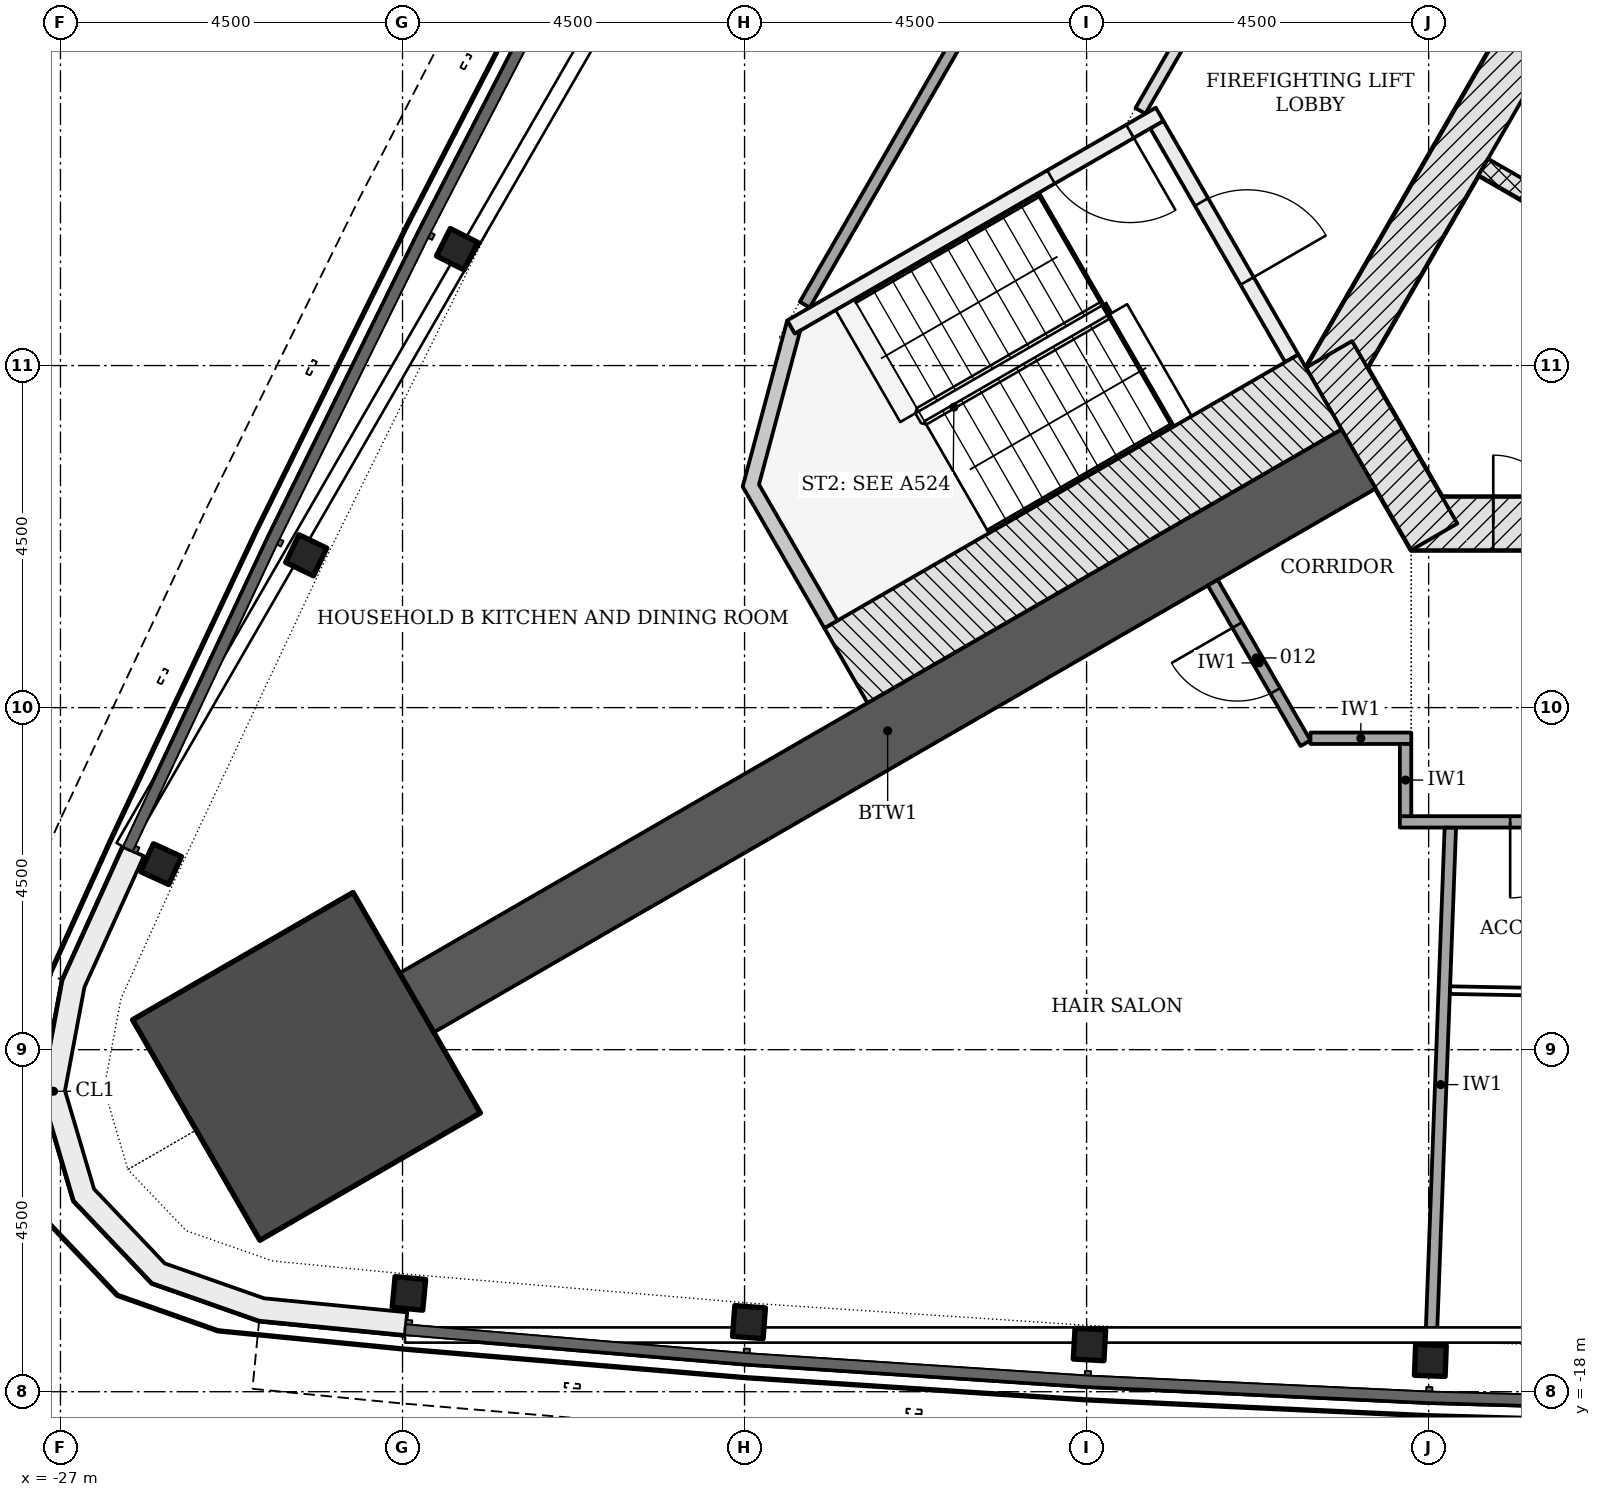
"""IFC4 building model, lengths in metres.
Left out: names, types, materials, properties, quantities, classifications, styles, units other than length and angle.
Written with IfcOpenShell. Run it as: python <this file> out.ifc"""

import sys

from ifc_helpers import new_model, si_unit, direction, frame, frame_2d, origin, origin_2d, place, context, subcontext, project, spatial, polyline, rectangle, i_section, outline, extrude, element, fill, save


model = new_model("IFC4")
c1 = context("Model", 3, precision=1e-05, world=origin(), true_north=direction((0.0, 1.0)))
c2 = subcontext(c1, "Body", "Model", "MODEL_VIEW")
j1 = project(units=[si_unit("LENGTHUNIT", "METRE"), si_unit("PLANEANGLEUNIT", "RADIAN")], contexts=[c1])
p1 = place(None, origin())
s1 = spatial("IfcSite", under=j1, at=p1, CompositionType="ELEMENT")
p2 = place(p1, origin())
s2 = spatial("IfcBuilding", under=s1, at=p2, CompositionType="ELEMENT")
p3 = place(p2, frame((0.0, 0.0, 34.8)))
s3 = spatial("IfcBuildingStorey", under=s2, at=p3, CompositionType="ELEMENT", Elevation=34.8)
p4 = place(p3, frame((-9.229, -6.578, -0.2), z_axis=(0.0, 0.0, 1.0), x_axis=(1.0, 0.0, 0.0)))
e1 = element("IfcWall", 1, at=p4, inside=s3, PredefinedType="SHEAR", context=c2, shape_type="SweptSolid", body=[
    extrude(rectangle(XDim=18.458, YDim=0.7, at=frame_2d((9.229, 0.0))), origin(), (0.0, 0.0, 1.0), 3.6),
])
p5 = place(p4, frame((3.304, 0.0, 0.2)))
e2 = element("IfcOpeningElement", 2, at=p5, cuts=e1, PredefinedType="OPENING", context=c2, shape_type="SweptSolid", body=[
    extrude(rectangle(XDim=1.1, YDim=2.1, at=frame_2d((0.55, 1.05))), frame((0.0, 0.36, 0.0), z_axis=(0.0, -1.0, 0.0), x_axis=(1.0, 0.0, 0.0)), (0.0, 0.0, 1.0), 0.72),
])
p6 = place(p4, frame((5.454, 0.0, 0.2)))
e3 = element("IfcOpeningElement", 3, at=p6, cuts=e1, PredefinedType="OPENING", context=c2, shape_type="SweptSolid", body=[
    extrude(rectangle(XDim=1.1, YDim=2.1, at=frame_2d((0.55, 1.05))), frame((0.0, 0.36, 0.0), z_axis=(0.0, -1.0, 0.0), x_axis=(1.0, 0.0, 0.0)), (0.0, 0.0, 1.0), 0.72),
])
p7 = place(p4, frame((7.604, 0.0, 0.2)))
e4 = element("IfcOpeningElement", 4, at=p7, cuts=e1, PredefinedType="OPENING", context=c2, shape_type="SweptSolid", body=[
    extrude(rectangle(XDim=1.1, YDim=2.1, at=frame_2d((0.55, 1.05))), frame((0.0, 0.36, 0.0), z_axis=(0.0, -1.0, 0.0), x_axis=(1.0, 0.0, 0.0)), (0.0, 0.0, 1.0), 0.72),
])
p8 = place(p4, frame((9.754, 0.0, 0.2)))
e5 = element("IfcOpeningElement", 5, at=p8, cuts=e1, PredefinedType="OPENING", context=c2, shape_type="SweptSolid", body=[
    extrude(rectangle(XDim=1.1, YDim=2.1, at=frame_2d((0.55, 1.05))), frame((0.0, 0.36, 0.0), z_axis=(0.0, -1.0, 0.0), x_axis=(1.0, 0.0, 0.0)), (0.0, 0.0, 1.0), 0.72),
])
p9 = place(p4, frame((11.904, 0.0, 0.2)))
e6 = element("IfcOpeningElement", 6, at=p9, cuts=e1, PredefinedType="OPENING", context=c2, shape_type="SweptSolid", body=[
    extrude(rectangle(XDim=1.1, YDim=2.1, at=frame_2d((0.55, 1.05))), frame((0.0, 0.36, 0.0), z_axis=(0.0, -1.0, 0.0), x_axis=(1.0, 0.0, 0.0)), (0.0, 0.0, 1.0), 0.72),
])
p10 = place(p4, frame((14.054, 0.0, 0.2)))
e7 = element("IfcOpeningElement", 7, at=p10, cuts=e1, PredefinedType="OPENING", context=c2, shape_type="SweptSolid", body=[
    extrude(rectangle(XDim=1.1, YDim=2.1, at=frame_2d((0.55, 1.05))), frame((0.0, 0.36, 0.0), z_axis=(0.0, -1.0, 0.0), x_axis=(1.0, 0.0, 0.0)), (0.0, 0.0, 1.0), 0.72),
])
p11 = place(p4, frame((1.079, 0.0, 0.2)))
e8 = element("IfcOpeningElement", 8, at=p11, cuts=e1, PredefinedType="OPENING", context=c2, shape_type="SweptSolid", body=[
    extrude(rectangle(XDim=0.9, YDim=2.1, at=frame_2d((0.45, 1.05))), frame((0.0, 0.36, 0.0), z_axis=(0.0, -1.0, 0.0), x_axis=(1.0, 0.0, 0.0)), (0.0, 0.0, 1.0), 0.72),
])
p12 = place(p3, frame((-1.083, 11.281, -0.2), z_axis=(0.0, 0.0, 1.0), x_axis=(-0.500001446645, -0.866024568562, 0.0)))
e9 = element("IfcWall", 9, at=p12, inside=s3, PredefinedType="SHEAR", context=c2, shape_type="SweptSolid", body=[
    extrude(rectangle(XDim=18.458, YDim=0.7, at=frame_2d((9.229, 0.0))), origin(), (0.0, 0.0, 1.0), 3.6),
])
p13 = place(p12, frame((8.979, 0.0, 0.2)))
e10 = element("IfcOpeningElement", 10, at=p13, cuts=e9, PredefinedType="OPENING", context=c2, shape_type="SweptSolid", body=[
    extrude(rectangle(XDim=1.2, YDim=2.1, at=frame_2d((0.6, 1.05))), frame((0.0, 0.36, 0.0), z_axis=(0.0, -1.0, 0.0), x_axis=(1.0, 0.0, 0.0)), (0.0, 0.0, 1.0), 0.72),
])
p14 = place(p12, frame((11.029, 0.0, 0.2)))
e11 = element("IfcOpeningElement", 11, at=p14, cuts=e9, PredefinedType="OPENING", context=c2, shape_type="SweptSolid", body=[
    extrude(rectangle(XDim=1.2, YDim=2.1, at=frame_2d((0.6, 1.05))), frame((0.0, 0.36, 0.0), z_axis=(0.0, -1.0, 0.0), x_axis=(1.0, 0.0, 0.0)), (0.0, 0.0, 1.0), 0.72),
])
p15 = place(p3, frame((-10.311, -4.353, -0.2), z_axis=(0.0, 0.0, 1.0), x_axis=(0.500042739161, -0.866000726912, 0.0)))
e12 = element("IfcWall", 12, at=p15, inside=s3, PredefinedType="SHEAR", context=c2, shape_type="SweptSolid", body=[
    extrude(rectangle(XDim=2.771, YDim=0.7, at=frame_2d((1.386, 0.0))), origin(), (0.0, 0.0, 1.0), 3.6),
])
p16 = place(p3, frame((-9.922, -5.728, -0.2), z_axis=(0.0, 0.0, 1.0), x_axis=(-0.866025331845, -0.500000124603, 0.0)))
e13 = element("IfcWall", 13, at=p16, inside=s3, PredefinedType="SHEAR", context=c2, shape_type="SweptSolid", body=[
    extrude(rectangle(XDim=14.309, YDim=0.9, at=frame_2d((7.154, 0.0))), origin(), (0.0, 0.0, 1.0), 3.6),
])
p17 = place(p3, frame((-23.764, -13.72, -0.2), z_axis=(0.0, 0.0, 1.0), x_axis=(-0.866025403784, -0.5, 0.0)))
e14 = element("IfcColumn", 14, at=p17, inside=s3, PredefinedType="COLUMN", context=c2, shape_type="SweptSolid", body=[
    extrude(rectangle(XDim=3.35, YDim=3.35, at=origin_2d()), origin(), (0.0, 0.0, 1.0), 3.6),
])
for number, where, z_axis, x_axis in (
    (15, (-21.781, -2.969, -0.2), (0.0, 0.0, 1.0), (-0.451, -0.893, 0.0)),
    (16, (-23.767, -6.996, -0.2), (0.0, 0.0, 1.0), (-0.434, -0.901, 0.0)),
    (17, (-25.676, -11.059, -0.2), (0.0, 0.0, 1.0), (-0.417, -0.909, 0.0)),
    (18, (-22.416, -16.707, -0.2), (0.0, 0.0, 1.0), (0.996, -0.094, 0.0)),
    (19, (-17.942, -17.084, -0.2), (0.0, 0.0, 1.0), (0.997, -0.075, 0.0)),
    (20, (-13.462, -17.379, -0.2), (0.0, 0.0, 1.0), (0.998, -0.056, 0.0)),
    (21, (-8.977, -17.589, -0.2), (0.0, 0.0, 1.0), (0.999, -0.037, 0.0)),
):
    element("IfcColumn", number, at=place(p3, frame(where, z_axis=z_axis, x_axis=x_axis)), inside=s3, PredefinedType="COLUMN", context=c2, shape_type="SweptSolid", body=[
        extrude(i_section(OverallWidth=0.404, OverallDepth=0.406, WebThickness=0.027, FlangeThickness=0.044, FilletRadius=0.015, at=origin_2d()), origin(), (0.0, 0.0, 1.0), 3.6),
    ])
p18 = place(p3, origin())
e22 = element("IfcWall", 22, at=p18, inside=s3, PredefinedType="NOTDEFINED", context=c2, shape_type="SweptSolid", body=[
    extrude(outline(polyline([(-26.176, -10.83), (-26.973, -12.586), (-27.249, -14.055), (-26.825, -15.488), (-25.796, -16.571), (-24.386, -17.066), (-22.467, -17.254), (-22.438, -16.956), (-24.321, -16.771), (-25.628, -16.312), (-26.558, -15.333), (-26.94, -14.039), (-26.685, -12.677), (-25.903, -10.954), (-26.176, -10.83)])), origin(), (0.0, 0.0, 1.0), 3.3),
])
p19 = place(p3, frame((-8.281, -1.887, -0.2), z_axis=(0.0, 0.0, 1.0), x_axis=(0.866032775405, -0.499987231761, 0.0)))
e23 = element("IfcWall", 23, at=p19, inside=s3, PredefinedType="PARTITIONING", context=c2, shape_type="SweptSolid", body=[
    extrude(rectangle(XDim=2.9, YDim=0.25, at=frame_2d((1.45, 0.0))), origin(), (0.0, 0.0, 1.0), 3.6),
])
p20 = place(p3, frame((-12.576, -1.331, -0.2), z_axis=(0.0, 0.0, 1.0), x_axis=(0.499970499736, -0.8660424351, 0.0)))
e24 = element("IfcWall", 24, at=p20, inside=s3, PredefinedType="SHEAR", context=c2, shape_type="SweptSolid", body=[
    extrude(rectangle(XDim=3.55, YDim=0.2, at=frame_2d((1.775, 0.0))), origin(), (0.0, 0.0, 1.0), 3.6),
])
p21 = place(p20, frame((1.175, 0.0, 0.2)))
e25 = element("IfcOpeningElement", 25, at=p21, cuts=e24, PredefinedType="OPENING", context=c2, shape_type="SweptSolid", body=[
    extrude(rectangle(XDim=1.2, YDim=2.1, at=frame_2d((0.6, 1.05))), frame((0.0, 0.11, 0.0), z_axis=(0.0, -1.0, 0.0), x_axis=(1.0, 0.0, 0.0)), (0.0, 0.0, 1.0), 0.22),
])
p22 = place(p3, frame((-12.539, -1.194, -0.2), z_axis=(0.0, 0.0, 1.0), x_axis=(-0.866045472092, -0.499965239061, 0.0)))
e26 = element("IfcWall", 26, at=p22, inside=s3, PredefinedType="SHEAR", context=c2, shape_type="SweptSolid", body=[
    extrude(rectangle(XDim=5.6, YDim=0.2, at=frame_2d((2.8, 0.0))), origin(), (0.0, 0.0, 1.0), 3.6),
])
p23 = place(p22, frame((0.45, 0.0, 0.2)))
e27 = element("IfcOpeningElement", 27, at=p23, cuts=e26, PredefinedType="OPENING", context=c2, shape_type="SweptSolid", body=[
    extrude(rectangle(XDim=1.2, YDim=2.1, at=frame_2d((0.6, 1.05))), frame((0.0, 0.11, 0.0), z_axis=(0.0, -1.0, 0.0), x_axis=(1.0, 0.0, 0.0)), (0.0, 0.0, 1.0), 0.22),
])
p24 = place(p3, frame((-10.43, -4.847, -0.2), z_axis=(0.0, 0.0, 1.0), x_axis=(-0.866018442252, -0.500012057535, 0.0)))
e28 = element("IfcWall", 28, at=p24, inside=s3, PredefinedType="SHEAR", context=c2, shape_type="SweptSolid", body=[
    extrude(rectangle(XDim=7.2, YDim=1.136, at=frame_2d((3.6, 0.0))), origin(), (0.0, 0.0, 1.0), 3.6),
])
p25 = place(p3, frame((0.0, 0.0, -0.2)))
e29 = element("IfcWall", 29, at=p25, inside=s3, PredefinedType="SHEAR", context=c2, shape_type="SweptSolid", body=[
    extrude(outline(polyline([(-17.439, -3.907), (-18.025, -6.093), (-16.95, -7.955), (-16.777, -7.855), (-17.81, -6.065), (-17.267, -4.039), (-17.339, -4.081), (-17.339, -4.081), (-17.339, -4.081), (-17.339, -4.081), (-17.339, -4.081), (-17.339, -4.081), (-17.339, -4.081), (-17.339, -4.081), (-17.339, -4.081), (-17.339, -4.081), (-17.339, -4.081), (-17.339, -4.081), (-17.339, -4.081), (-17.339, -4.081), (-17.339, -4.081), (-17.339, -4.081), (-17.339, -4.081), (-17.439, -3.907)])), origin(), (0.0, 0.0, 1.0), 3.6),
])
p26 = place(p3, frame((-17.208, -3.699, 0.0), z_axis=(0.0, 0.0, 1.0), x_axis=(0.499997567621, 0.866026808115, 0.0)))
e30 = element("IfcWall", 30, at=p26, inside=s3, PredefinedType="PARTITIONING", context=c2, shape_type="SweptSolid", body=[
    extrude(rectangle(XDim=23.736, YDim=0.15, at=frame_2d((11.868, 0.0))), origin(), (0.0, 0.0, 1.0), 2.768),
])
p27 = place(p26, frame((19.07, 0.0, 0.0)))
e31 = element("IfcOpeningElement", 31, at=p27, cuts=e30, PredefinedType="OPENING", context=c2, shape_type="SweptSolid", body=[
    extrude(rectangle(XDim=1.1, YDim=2.1, at=frame_2d((0.55, 1.05))), frame((0.0, 0.085, 0.0), z_axis=(0.0, -1.0, 0.0), x_axis=(1.0, 0.0, 0.0)), (0.0, 0.0, 1.0), 0.17),
])
p28 = place(p26, frame((7.225, 0.0, 0.0)))
e32 = element("IfcOpeningElement", 32, at=p28, cuts=e30, PredefinedType="OPENING", context=c2, shape_type="SweptSolid", body=[
    extrude(rectangle(XDim=1.5, YDim=2.1, at=frame_2d((0.75, 1.05))), frame((0.0, 0.085, 0.0), z_axis=(0.0, -1.0, 0.0), x_axis=(1.0, 0.0, 0.0)), (0.0, 0.0, 1.0), 0.17),
])
p29 = place(p3, frame((-4.407, 13.374, 0.0), z_axis=(0.0, 0.0, 1.0), x_axis=(-0.499997181693, -0.866027030928, 0.0)))
e33 = element("IfcWall", 33, at=p29, inside=s3, PredefinedType="PARTITIONING", context=c2, shape_type="SweptSolid", body=[
    extrude(rectangle(XDim=16.77, YDim=0.15, at=frame_2d((8.385, 0.0))), origin(), (0.0, 0.0, 1.0), 2.768),
])
p30 = place(p29, frame((8.879, 0.0, 0.0)))
e34 = element("IfcOpeningElement", 34, at=p30, cuts=e33, PredefinedType="OPENING", context=c2, shape_type="SweptSolid", body=[
    extrude(rectangle(XDim=1.0, YDim=2.1, at=frame_2d((0.5, 1.05))), frame((0.0, 0.085, 0.0), z_axis=(0.0, -1.0, 0.0), x_axis=(1.0, 0.0, 0.0)), (0.0, 0.0, 1.0), 0.17),
])
p31 = place(p3, frame((3.689, -10.503, 0.0), z_axis=(0.0, 0.0, 1.0), x_axis=(-1.0, 0.0, 0.0)))
e35 = element("IfcWall", 35, at=p31, inside=s3, PredefinedType="PARTITIONING", context=c2, shape_type="SweptSolid", body=[
    extrude(rectangle(XDim=13.068, YDim=0.15, at=frame_2d((6.534, 0.0))), origin(), (0.0, 0.0, 1.0), 2.768),
])
p32 = place(p31, frame((10.617, 0.0, 0.0)))
e36 = element("IfcOpeningElement", 36, at=p32, cuts=e35, PredefinedType="OPENING", context=c2, shape_type="SweptSolid", body=[
    extrude(rectangle(XDim=1.0, YDim=2.1, at=frame_2d((0.5, 1.05))), frame((0.0, 0.085, 0.0), z_axis=(0.0, -1.0, 0.0), x_axis=(1.0, 0.0, 0.0)), (0.0, 0.0, 1.0), 0.17),
])
p33 = place(p31, frame((8.054, 0.0, 0.0)))
e37 = element("IfcOpeningElement", 37, at=p33, cuts=e35, PredefinedType="OPENING", context=c2, shape_type="SweptSolid", body=[
    extrude(rectangle(XDim=1.0, YDim=2.1, at=frame_2d((0.5, 1.05))), frame((0.0, 0.085, 0.0), z_axis=(0.0, -1.0, 0.0), x_axis=(1.0, 0.0, 0.0)), (0.0, 0.0, 1.0), 0.17),
])
p34 = place(p31, frame((4.734, 0.0, 0.0)))
e38 = element("IfcOpeningElement", 38, at=p34, cuts=e35, PredefinedType="OPENING", context=c2, shape_type="SweptSolid", body=[
    extrude(rectangle(XDim=1.5, YDim=2.1, at=frame_2d((0.75, 1.05))), frame((0.0, 0.085, 0.0), z_axis=(0.0, -1.0, 0.0), x_axis=(1.0, 0.0, 0.0)), (0.0, 0.0, 1.0), 0.17),
])
p35 = place(p3, frame((-10.62, -9.468, 0.0), z_axis=(0.0, 0.0, 1.0), x_axis=(-0.500045838785, 0.865998937132, 0.0)))
e39 = element("IfcWall", 39, at=p35, inside=s3, PredefinedType="PARTITIONING", context=c2, shape_type="SweptSolid", body=[
    extrude(rectangle(XDim=2.44, YDim=0.15, at=frame_2d((1.22, 0.0))), origin(), (0.0, 0.0, 1.0), 3.4),
])
p36 = place(p35, frame((0.795, 0.0, 0.0)))
e40 = element("IfcOpeningElement", 40, at=p36, cuts=e39, PredefinedType="OPENING", context=c2, shape_type="SweptSolid", body=[
    extrude(rectangle(XDim=1.0, YDim=2.1, at=frame_2d((0.5, 1.05))), frame((0.0, 0.085, 0.0), z_axis=(0.0, -1.0, 0.0), x_axis=(1.0, 0.0, 0.0)), (0.0, 0.0, 1.0), 0.17),
])
p37 = place(p3, frame((-10.555, -9.403, 0.0), z_axis=(0.0, 0.0, 1.0), x_axis=(1.0, 0.0, 0.0)))
e41 = element("IfcWall", 41, at=p37, inside=s3, PredefinedType="PARTITIONING", context=c2, shape_type="SweptSolid", body=[
    extrude(rectangle(XDim=1.326, YDim=0.15, at=frame_2d((0.663, 0.0))), origin(), (0.0, 0.0, 1.0), 3.4),
])
p38 = place(p3, frame((-9.304, -10.428, 0.0), z_axis=(0.0, 0.0, 1.0), x_axis=(0.0, 1.0, 0.0)))
e42 = element("IfcWall", 42, at=p38, inside=s3, PredefinedType="PARTITIONING", context=c2, shape_type="SweptSolid", body=[
    extrude(rectangle(XDim=0.95, YDim=0.15, at=frame_2d((0.475, 0.0))), origin(), (0.0, 0.0, 1.0), 3.4),
])
p39 = place(p3, frame((-8.968, -17.339, 0.0), z_axis=(0.0, 0.0, 1.0), x_axis=(0.037473660589, 0.999297615709, 0.0)))
e43 = element("IfcWall", 43, at=p39, inside=s3, PredefinedType="PARTITIONING", context=c2, shape_type="SweptSolid", body=[
    extrude(rectangle(XDim=6.762, YDim=0.15, at=frame_2d((3.381, 0.0))), origin(), (0.0, 0.0, 1.0), 2.778),
])
p40 = place(p3, frame((-8.719, -12.717, 0.0), z_axis=(0.0, 0.0, 1.0), x_axis=(0.999824773789, -0.018719554441, 0.0)))
e44 = element("IfcWall", 44, at=p40, inside=s3, PredefinedType="PARTITIONING", context=c2, shape_type="SweptSolid", body=[
    extrude(rectangle(XDim=5.113, YDim=0.1, at=frame_2d((2.556, 0.0))), origin(), (0.0, 0.0, 1.0), 2.768),
])
p41 = place(p11, origin())
e45 = element("IfcDoor", 45, at=p41, inside=s3, OperationType="SINGLE_SWING_LEFT", PredefinedType="DOOR", context=c2, shape_type="SweptSolid", body=[
    extrude(rectangle(XDim=0.9, YDim=2.1, at=frame_2d((0.45, 1.05))), frame((0.0, 0.075, 0.0), z_axis=(0.0, -1.0, 0.0), x_axis=(1.0, 0.0, 0.0)), (0.0, 0.0, 1.0), 0.15),
])
fill(e8, e45)
p42 = place(p21, origin())
e46 = element("IfcDoor", 46, at=p42, inside=s3, OperationType="SINGLE_SWING_RIGHT", PredefinedType="DOOR", context=c2, shape_type="SweptSolid", body=[
    extrude(rectangle(XDim=1.2, YDim=2.1, at=frame_2d((0.6, 1.05))), frame((0.0, 0.025, 0.0), z_axis=(0.0, -1.0, 0.0), x_axis=(1.0, 0.0, 0.0)), (0.0, 0.0, 1.0), 0.05),
])
fill(e25, e46)
p43 = place(p23, origin())
e47 = element("IfcDoor", 47, at=p43, inside=s3, OperationType="SINGLE_SWING_LEFT", PredefinedType="DOOR", context=c2, shape_type="SweptSolid", body=[
    extrude(rectangle(XDim=1.2, YDim=2.1, at=frame_2d((0.6, 1.05))), frame((0.0, 0.025, 0.0), z_axis=(0.0, -1.0, 0.0), x_axis=(1.0, 0.0, 0.0)), (0.0, 0.0, 1.0), 0.05),
])
fill(e27, e47)
p44 = place(p32, origin())
e48 = element("IfcDoor", 48, at=p44, inside=s3, OperationType="SINGLE_SWING_RIGHT", PredefinedType="DOOR", context=c2, shape_type="SweptSolid", body=[
    extrude(rectangle(XDim=1.0, YDim=2.1, at=frame_2d((0.5, 1.05))), frame((0.0, 0.025, 0.0), z_axis=(0.0, -1.0, 0.0), x_axis=(1.0, 0.0, 0.0)), (0.0, 0.0, 1.0), 0.05),
])
fill(e36, e48)
p45 = place(p36, origin())
e49 = element("IfcDoor", 49, at=p45, inside=s3, OperationType="SINGLE_SWING_RIGHT", PredefinedType="DOOR", context=c2, shape_type="SweptSolid", body=[
    extrude(rectangle(XDim=1.0, YDim=2.1, at=frame_2d((0.5, 1.05))), frame((0.0, 0.025, 0.0), z_axis=(0.0, -1.0, 0.0), x_axis=(1.0, 0.0, 0.0)), (0.0, 0.0, 1.0), 0.05),
])
fill(e40, e49)
save(model, sys.argv[1])
